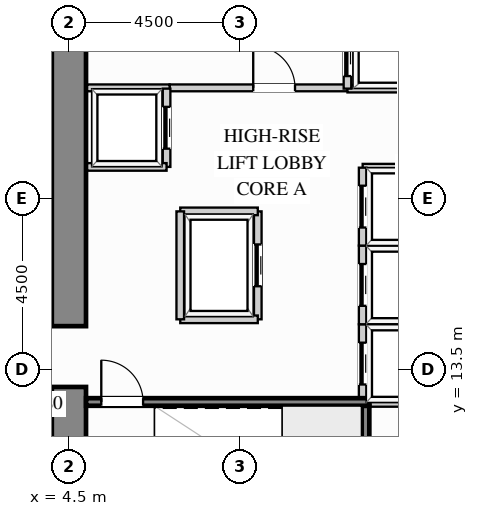
"""IFC4 building model, lengths in metres.
Left out: names, types, materials, properties, quantities, classifications, styles, units other than length and angle.
Written with IfcOpenShell. Run it as: python <this file> out.ifc"""

import sys

from ifc_helpers import new_model, si_unit, direction, frame, frame_2d, origin, place, context, subcontext, project, spatial, rectangle, extrude, source, transform, mapped, element, fill, save


model = new_model("IFC4")
c1 = context("Model", 3, precision=1e-05, world=origin(), true_north=direction((0.0, 1.0)))
c2 = subcontext(c1, "Body", "Model", "MODEL_VIEW")
j1 = project(units=[si_unit("LENGTHUNIT", "METRE"), si_unit("PLANEANGLEUNIT", "RADIAN")], contexts=[c1])
p1 = place(None, origin())
s1 = spatial("IfcSite", under=j1, at=p1, CompositionType="ELEMENT")
p2 = place(p1, origin())
s2 = spatial("IfcBuilding", under=s1, at=p2, CompositionType="ELEMENT")
p3 = place(p2, origin())
s3 = spatial("IfcBuildingStorey", under=s2, at=p3, CompositionType="ELEMENT", Elevation=0.0)
m1 = source(origin(), c2, "Body", "SweptSolid", [
    extrude(rectangle(XDim=4.1, YDim=0.9, at=frame_2d((2.05, 0.0))), origin(), (0.0, 0.0, 1.0), 4.25),
])
p4 = place(p3, frame((4.5, 8.95, 0.0), z_axis=(0.0, 0.0, 1.0), x_axis=(0.0, 1.0, 0.0)))
e1 = element("IfcWall", 1, at=p4, inside=s3, PredefinedType="SHEAR", context=c2, shape_type="MappedRepresentation", body=[
    mapped(m1, transform((0.0, 0.0, 0.0), x_axis=(1.0, 0.0, 0.0), y_axis=(0.0, 1.0, 0.0), z_axis=(0.0, 0.0, 1.0))),
])
m2 = source(origin(), c2, "Body", "SweptSolid", [
    extrude(rectangle(XDim=14.4, YDim=0.9, at=frame_2d((7.2, 0.0))), origin(), (0.0, 0.0, 1.0), 4.25),
])
p5 = place(p3, frame((4.5, 14.65, 0.0), z_axis=(0.0, 0.0, 1.0), x_axis=(0.0, 1.0, 0.0)))
e2 = element("IfcWall", 2, at=p5, inside=s3, PredefinedType="SHEAR", context=c2, shape_type="MappedRepresentation", body=[
    mapped(m2, transform((0.0, 0.0, 0.0), x_axis=(1.0, 0.0, 0.0), y_axis=(0.0, 1.0, 0.0), z_axis=(0.0, 0.0, 1.0))),
])
p6 = place(p3, frame((7.15, 20.92, 0.0), z_axis=(0.0, 0.0, 1.0), x_axis=(1.0, 0.0, 0.0)))
e3 = element("IfcWall", 3, at=p6, inside=s3, PredefinedType="PARTITIONING", context=c2, shape_type="SweptSolid", body=[
    extrude(rectangle(XDim=4.68, YDim=0.18, at=frame_2d((2.34, 0.0))), origin(), (0.0, 0.0, 1.0), 4.235),
])
p7 = place(p6, frame((2.2, 0.0, 0.0)))
e4 = element("IfcOpeningElement", 4, at=p7, cuts=e3, PredefinedType="OPENING", context=c2, shape_type="SweptSolid", body=[
    extrude(rectangle(XDim=1.1, YDim=2.15, at=frame_2d((0.55, 1.075))), frame((0.0, 0.1, 0.0), z_axis=(0.0, -1.0, 0.0), x_axis=(1.0, 0.0, 0.0)), (0.0, 0.0, 1.0), 0.2),
])
m3 = source(origin(), c2, "Body", "SweptSolid", [
    extrude(rectangle(XDim=2.17, YDim=0.18, at=frame_2d((1.085, 0.0))), origin(), (0.0, 0.0, 1.0), 4.235),
])
p8 = place(p3, frame((4.98, 20.92, 0.0), z_axis=(0.0, 0.0, 1.0), x_axis=(1.0, 0.0, 0.0)))
e5 = element("IfcWall", 5, at=p8, inside=s3, PredefinedType="PARTITIONING", context=c2, shape_type="MappedRepresentation", body=[
    mapped(m3, transform((0.0, 0.0, 0.0), x_axis=(1.0, 0.0, 0.0), y_axis=(0.0, 1.0, 0.0), z_axis=(0.0, 0.0, 1.0))),
])
m4 = source(origin(), c2, "Body", "SweptSolid", [
    extrude(rectangle(XDim=2.19, YDim=0.2, at=frame_2d((1.095, 0.0))), origin(), (0.0, 0.0, 1.0), 4.235),
])
p9 = place(p3, frame((11.83, 20.9, 0.0), z_axis=(0.0, 0.0, 1.0), x_axis=(1.0, 0.0, 0.0)))
e6 = element("IfcWall", 6, at=p9, inside=s3, PredefinedType="PARTITIONING", context=c2, shape_type="MappedRepresentation", body=[
    mapped(m4, transform((0.0, 0.0, 0.0), x_axis=(1.0, 0.0, 0.0), y_axis=(0.0, 1.0, 0.0), z_axis=(0.0, 0.0, 1.0))),
])
p10 = place(p3, frame((11.83, 20.9, 0.0), z_axis=(0.0, 0.0, 1.0), x_axis=(0.0, 1.0, 0.0)))
e7 = element("IfcWall", 7, at=p10, inside=s3, PredefinedType="PARTITIONING", context=c2, shape_type="SweptSolid", body=[
    extrude(rectangle(XDim=1.76, YDim=0.2, at=frame_2d((0.88, 0.0))), origin(), (0.0, 0.0, 1.0), 4.235),
])
p11 = place(p10, frame((0.33, 0.0, 0.0)))
e8 = element("IfcOpeningElement", 8, at=p11, cuts=e7, PredefinedType="OPENING", context=c2, shape_type="SweptSolid", body=[
    extrude(rectangle(XDim=1.1, YDim=2.2, at=frame_2d((0.55, 1.1))), frame((0.0, 0.11, 0.0), z_axis=(0.0, -1.0, 0.0), x_axis=(1.0, 0.0, 0.0)), (0.0, 0.0, 1.0), 0.22),
])
m5 = source(origin(), c2, "Body", "SweptSolid", [
    extrude(rectangle(XDim=1.79, YDim=0.2, at=frame_2d((0.895, 0.0))), origin(), (0.0, 0.0, 1.0), 4.235),
])
for number, where, z_axis, x_axis in (
    (9, (12.23, 14.7, 0.0), (0.0, 0.0, 1.0), (1.0, 0.0, 0.0)),
    (10, (12.23, 12.63, 0.0), (0.0, 0.0, 1.0), (1.0, 0.0, 0.0)),
):
    element("IfcWall", number, at=place(p3, frame(where, z_axis=z_axis, x_axis=x_axis)), inside=s3, PredefinedType="PARTITIONING", context=c2, shape_type="MappedRepresentation", body=[
        mapped(m5, transform((0.0, 0.0, 0.0), x_axis=(1.0, 0.0, 0.0), y_axis=(0.0, 1.0, 0.0), z_axis=(0.0, 0.0, 1.0))),
    ])
p12 = place(p3, frame((12.23, 12.63, 0.0), z_axis=(0.0, 0.0, 1.0), x_axis=(0.0, 1.0, 0.0)))
e11 = element("IfcWall", 11, at=p12, inside=s3, PredefinedType="PARTITIONING", context=c2, shape_type="SweptSolid", body=[
    extrude(rectangle(XDim=2.07, YDim=0.2, at=frame_2d((1.035, 0.0))), origin(), (0.0, 0.0, 1.0), 4.235),
])
p13 = place(p12, frame((0.485, 0.0, 0.0)))
e12 = element("IfcOpeningElement", 12, at=p13, cuts=e11, PredefinedType="OPENING", context=c2, shape_type="SweptSolid", body=[
    extrude(rectangle(XDim=1.1, YDim=2.2, at=frame_2d((0.55, 1.1))), frame((0.0, 0.11, 0.0), z_axis=(0.0, -1.0, 0.0), x_axis=(1.0, 0.0, 0.0)), (0.0, 0.0, 1.0), 0.22),
])
p14 = place(p3, frame((12.23, 16.77, 0.0), z_axis=(0.0, 0.0, 1.0), x_axis=(1.0, 0.0, 0.0)))
e13 = element("IfcWall", 13, at=p14, inside=s3, PredefinedType="PARTITIONING", context=c2, shape_type="MappedRepresentation", body=[
    mapped(m5, transform((0.0, 0.0, 0.0), x_axis=(1.0, 0.0, 0.0), y_axis=(0.0, 1.0, 0.0), z_axis=(0.0, 0.0, 1.0))),
])
p15 = place(p3, frame((12.23, 14.7, 0.0), z_axis=(0.0, 0.0, 1.0), x_axis=(0.0, 1.0, 0.0)))
e14 = element("IfcWall", 14, at=p15, inside=s3, PredefinedType="PARTITIONING", context=c2, shape_type="SweptSolid", body=[
    extrude(rectangle(XDim=2.07, YDim=0.2, at=frame_2d((1.035, 0.0))), origin(), (0.0, 0.0, 1.0), 4.235),
])
p16 = place(p15, frame((0.485, 0.0, 0.0)))
e15 = element("IfcOpeningElement", 15, at=p16, cuts=e14, PredefinedType="OPENING", context=c2, shape_type="SweptSolid", body=[
    extrude(rectangle(XDim=1.1, YDim=2.2, at=frame_2d((0.55, 1.1))), frame((0.0, 0.11, 0.0), z_axis=(0.0, -1.0, 0.0), x_axis=(1.0, 0.0, 0.0)), (0.0, 0.0, 1.0), 0.22),
])
p17 = place(p3, frame((12.23, 18.82, 0.0), z_axis=(0.0, 0.0, 1.0), x_axis=(1.0, 0.0, 0.0)))
e16 = element("IfcWall", 16, at=p17, inside=s3, PredefinedType="PARTITIONING", context=c2, shape_type="MappedRepresentation", body=[
    mapped(m5, transform((0.0, 0.0, 0.0), x_axis=(1.0, 0.0, 0.0), y_axis=(0.0, 1.0, 0.0), z_axis=(0.0, 0.0, 1.0))),
])
p18 = place(p3, frame((12.23, 16.77, 0.0), z_axis=(0.0, 0.0, 1.0), x_axis=(0.0, 1.0, 0.0)))
e17 = element("IfcWall", 17, at=p18, inside=s3, PredefinedType="PARTITIONING", context=c2, shape_type="SweptSolid", body=[
    extrude(rectangle(XDim=2.05, YDim=0.2, at=frame_2d((1.025, 0.0))), origin(), (0.0, 0.0, 1.0), 4.235),
])
p19 = place(p18, frame((0.475, 0.0, 0.0)))
e18 = element("IfcOpeningElement", 18, at=p19, cuts=e17, PredefinedType="OPENING", context=c2, shape_type="SweptSolid", body=[
    extrude(rectangle(XDim=1.1, YDim=2.2, at=frame_2d((0.55, 1.1))), frame((0.0, 0.11, 0.0), z_axis=(0.0, -1.0, 0.0), x_axis=(1.0, 0.0, 0.0)), (0.0, 0.0, 1.0), 0.22),
])
p20 = place(p3, frame((7.07, 18.84, 0.0), z_axis=(0.0, 0.0, 1.0), x_axis=(0.0, 1.0, 0.0)))
e19 = element("IfcWall", 19, at=p20, inside=s3, PredefinedType="PARTITIONING", context=c2, shape_type="SweptSolid", body=[
    extrude(rectangle(XDim=2.06, YDim=0.2, at=frame_2d((1.03, 0.0))), origin(), (0.0, 0.0, 1.0), 4.235),
])
p21 = place(p20, frame((0.48, 0.0, 0.0)))
e20 = element("IfcOpeningElement", 20, at=p21, cuts=e19, PredefinedType="OPENING", context=c2, shape_type="SweptSolid", body=[
    extrude(rectangle(XDim=1.1, YDim=2.2, at=frame_2d((0.55, 1.1))), frame((0.0, 0.11, 0.0), z_axis=(0.0, -1.0, 0.0), x_axis=(1.0, 0.0, 0.0)), (0.0, 0.0, 1.0), 0.22),
])
m6 = source(origin(), c2, "Body", "SweptSolid", [
    extrude(rectangle(XDim=2.09, YDim=0.2, at=frame_2d((1.045, 0.0))), origin(), (0.0, 0.0, 1.0), 4.235),
])
p22 = place(p3, frame((4.98, 18.84, 0.0), z_axis=(0.0, 0.0, 1.0), x_axis=(1.0, 0.0, 0.0)))
e21 = element("IfcWall", 21, at=p22, inside=s3, PredefinedType="PARTITIONING", context=c2, shape_type="MappedRepresentation", body=[
    mapped(m6, transform((0.0, 0.0, 0.0), x_axis=(1.0, 0.0, 0.0), y_axis=(0.0, 1.0, 0.0), z_axis=(0.0, 0.0, 1.0))),
])
p23 = place(p3, frame((9.47, 14.83, 0.0), z_axis=(0.0, 0.0, 1.0), x_axis=(0.0, 1.0, 0.0)))
e22 = element("IfcWall", 22, at=p23, inside=s3, PredefinedType="PARTITIONING", context=c2, shape_type="SweptSolid", body=[
    extrude(rectangle(XDim=2.84, YDim=0.2, at=frame_2d((1.42, 0.0))), origin(), (0.0, 0.0, 1.0), 4.235),
])
p24 = place(p23, frame((0.87, 0.0, 0.0)))
e23 = element("IfcOpeningElement", 23, at=p24, cuts=e22, PredefinedType="OPENING", context=c2, shape_type="SweptSolid", body=[
    extrude(rectangle(XDim=1.1, YDim=2.2, at=frame_2d((0.55, 1.1))), frame((0.0, 0.11, 0.0), z_axis=(0.0, -1.0, 0.0), x_axis=(1.0, 0.0, 0.0)), (0.0, 0.0, 1.0), 0.22),
])
m7 = source(origin(), c2, "Body", "SweptSolid", [
    extrude(rectangle(XDim=2.04, YDim=0.2, at=frame_2d((1.02, 0.0))), origin(), (0.0, 0.0, 1.0), 4.235),
])
for number, where, z_axis, x_axis in (
    (24, (7.43, 17.67, 0.0), (0.0, 0.0, 1.0), (1.0, 0.0, 0.0)),
    (25, (7.43, 14.83, 0.0), (0.0, 0.0, 1.0), (1.0, 0.0, 0.0)),
):
    element("IfcWall", number, at=place(p3, frame(where, z_axis=z_axis, x_axis=x_axis)), inside=s3, PredefinedType="PARTITIONING", context=c2, shape_type="MappedRepresentation", body=[
        mapped(m7, transform((0.0, 0.0, 0.0), x_axis=(1.0, 0.0, 0.0), y_axis=(0.0, 1.0, 0.0), z_axis=(0.0, 0.0, 1.0))),
    ])
m8 = source(origin(), c2, "Body", "SweptSolid", [
    extrude(rectangle(XDim=2.84, YDim=0.2, at=frame_2d((1.42, 0.0))), origin(), (0.0, 0.0, 1.0), 4.235),
])
p25 = place(p3, frame((7.43, 14.83, 0.0), z_axis=(0.0, 0.0, 1.0), x_axis=(0.0, 1.0, 0.0)))
e26 = element("IfcWall", 26, at=p25, inside=s3, PredefinedType="PARTITIONING", context=c2, shape_type="MappedRepresentation", body=[
    mapped(m8, transform((0.0, 0.0, 0.0), x_axis=(1.0, 0.0, 0.0), y_axis=(0.0, 1.0, 0.0), z_axis=(0.0, 0.0, 1.0))),
])
m9 = source(origin(), c2, "Body", "SweptSolid", [
    extrude(rectangle(XDim=3.603, YDim=0.2, at=frame_2d((1.802, 0.0))), origin(), (0.0, 0.0, 1.0), 4.25),
])
p26 = place(p3, frame((12.305, 8.952, 0.0), z_axis=(0.0, 0.0, 1.0), x_axis=(0.0, 1.0, 0.0)))
e27 = element("IfcWall", 27, at=p26, inside=s3, PredefinedType="SHEAR", context=c2, shape_type="MappedRepresentation", body=[
    mapped(m9, transform((0.0, 0.0, 0.0), x_axis=(1.0, 0.0, 0.0), y_axis=(0.0, 1.0, 0.0), z_axis=(0.0, 0.0, 1.0))),
])
p27 = place(p3, frame((4.952, 12.655, 0.0), z_axis=(0.0, 0.0, 1.0), x_axis=(1.0, 0.0, 0.0)))
e28 = element("IfcWall", 28, at=p27, inside=s3, PredefinedType="SHEAR", context=c2, shape_type="SweptSolid", body=[
    extrude(rectangle(XDim=7.453, YDim=0.2, at=frame_2d((3.727, 0.0))), origin(), (0.0, 0.0, 1.0), 4.25),
])
p28 = place(p27, frame((0.4, 0.0, 0.0)))
e29 = element("IfcOpeningElement", 29, at=p28, cuts=e28, PredefinedType="OPENING", context=c2, shape_type="SweptSolid", body=[
    extrude(rectangle(XDim=1.1, YDim=2.15, at=frame_2d((0.55, 1.075))), frame((0.0, 0.11, 0.0), z_axis=(0.0, -1.0, 0.0), x_axis=(1.0, 0.0, 0.0)), (0.0, 0.0, 1.0), 0.22),
])
m10 = source(origin(), c2, "Body", "SweptSolid", [
    extrude(rectangle(XDim=1.1, YDim=2.15, at=frame_2d((0.55, 1.075))), frame((0.0, 0.025, 0.0), z_axis=(0.0, -1.0, 0.0), x_axis=(1.0, 0.0, 0.0)), (0.0, 0.0, 1.0), 0.05),
])
p29 = place(p7, origin())
e30 = element("IfcDoor", 30, at=p29, inside=s3, OperationType="SINGLE_SWING_LEFT", PredefinedType="DOOR", context=c2, shape_type="MappedRepresentation", body=[
    mapped(m10, transform((0.0, 0.0, 0.0), x_axis=(1.0, 0.0, 0.0), y_axis=(0.0, 1.0, 0.0), z_axis=(0.0, 0.0, 1.0))),
])
fill(e4, e30)
m11 = source(origin(), c2, "Body", "SweptSolid", [
    extrude(rectangle(XDim=1.1, YDim=2.2, at=frame_2d((0.55, 1.1))), frame((0.0, 0.025, 0.0), z_axis=(0.0, -1.0, 0.0), x_axis=(1.0, 0.0, 0.0)), (0.0, 0.0, 1.0), 0.05),
])
p30 = place(p11, origin())
e31 = element("IfcDoor", 31, at=p30, inside=s3, OperationType="SLIDING_TO_LEFT", PredefinedType="DOOR", context=c2, shape_type="MappedRepresentation", body=[
    mapped(m11, transform((0.0, 0.0, 0.0), x_axis=(1.0, 0.0, 0.0), y_axis=(0.0, 1.0, 0.0), z_axis=(0.0, 0.0, 1.0))),
])
fill(e8, e31)
p31 = place(p13, origin())
e32 = element("IfcDoor", 32, at=p31, inside=s3, OperationType="SLIDING_TO_LEFT", PredefinedType="DOOR", context=c2, shape_type="MappedRepresentation", body=[
    mapped(m11, transform((0.0, 0.0, 0.0), x_axis=(1.0, 0.0, 0.0), y_axis=(0.0, 1.0, 0.0), z_axis=(0.0, 0.0, 1.0))),
])
fill(e12, e32)
p32 = place(p16, origin())
e33 = element("IfcDoor", 33, at=p32, inside=s3, OperationType="SLIDING_TO_LEFT", PredefinedType="DOOR", context=c2, shape_type="MappedRepresentation", body=[
    mapped(m11, transform((0.0, 0.0, 0.0), x_axis=(1.0, 0.0, 0.0), y_axis=(0.0, 1.0, 0.0), z_axis=(0.0, 0.0, 1.0))),
])
fill(e15, e33)
p33 = place(p19, origin())
e34 = element("IfcDoor", 34, at=p33, inside=s3, OperationType="SLIDING_TO_LEFT", PredefinedType="DOOR", context=c2, shape_type="MappedRepresentation", body=[
    mapped(m11, transform((0.0, 0.0, 0.0), x_axis=(1.0, 0.0, 0.0), y_axis=(0.0, 1.0, 0.0), z_axis=(0.0, 0.0, 1.0))),
])
fill(e18, e34)
p34 = place(p21, origin())
e35 = element("IfcDoor", 35, at=p34, inside=s3, OperationType="SLIDING_TO_LEFT", PredefinedType="DOOR", context=c2, shape_type="MappedRepresentation", body=[
    mapped(m11, transform((0.0, 0.0, 0.0), x_axis=(1.0, 0.0, 0.0), y_axis=(0.0, 1.0, 0.0), z_axis=(0.0, 0.0, 1.0))),
])
fill(e20, e35)
p35 = place(p24, origin())
e36 = element("IfcDoor", 36, at=p35, inside=s3, OperationType="SLIDING_TO_LEFT", PredefinedType="DOOR", context=c2, shape_type="MappedRepresentation", body=[
    mapped(m11, transform((0.0, 0.0, 0.0), x_axis=(1.0, 0.0, 0.0), y_axis=(0.0, 1.0, 0.0), z_axis=(0.0, 0.0, 1.0))),
])
fill(e23, e36)
m12 = source(origin(), c2, "Body", "SweptSolid", [
    extrude(rectangle(XDim=1.1, YDim=2.15, at=frame_2d((0.55, 1.075))), frame((0.0, 0.025, 0.0), z_axis=(0.0, -1.0, 0.0), x_axis=(1.0, 0.0, 0.0)), (0.0, 0.0, 1.0), 0.05),
])
p36 = place(p28, origin())
e37 = element("IfcDoor", 37, at=p36, inside=s3, OperationType="SINGLE_SWING_LEFT", PredefinedType="DOOR", context=c2, shape_type="MappedRepresentation", body=[
    mapped(m12, transform((0.0, 0.0, 0.0), x_axis=(1.0, 0.0, 0.0), y_axis=(0.0, 1.0, 0.0), z_axis=(0.0, 0.0, 1.0))),
])
fill(e29, e37)
save(model, sys.argv[1])
